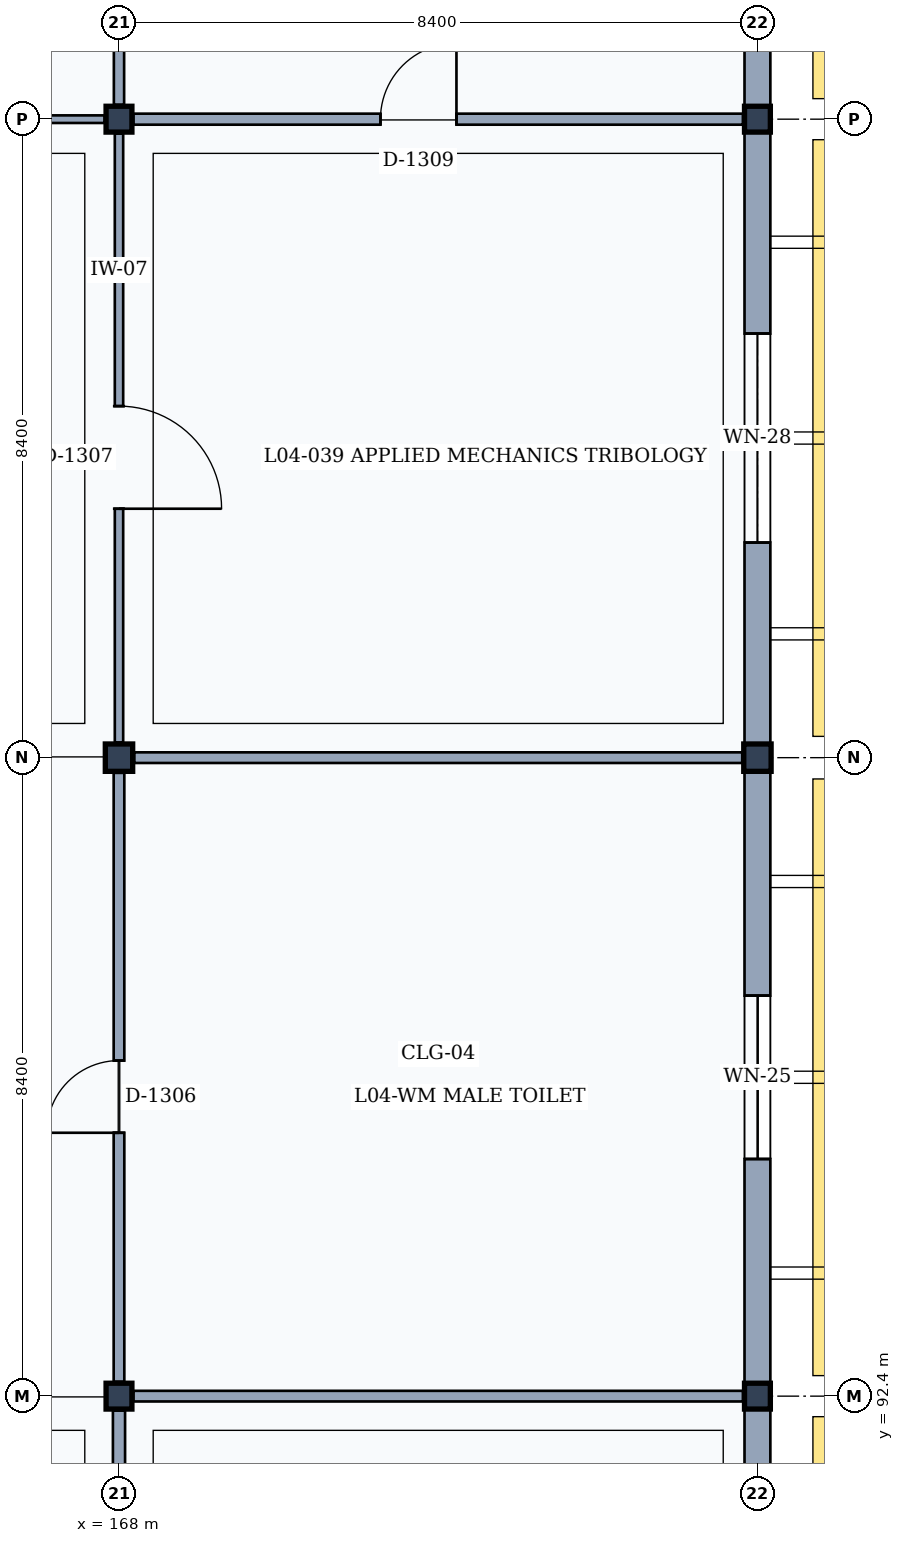
"""IFC4 building model, lengths in metres.
Left out: names, types, materials, properties, quantities, classifications, styles, units other than length and angle.
Written with IfcOpenShell. Run it as: python <this file> out.ifc"""

import sys

from ifc_helpers import new_model, si_unit, direction, frame, frame_2d, origin, origin_2d, place, context, subcontext, project, spatial, rectangle, extrude, element, fill, save


model = new_model("IFC4")
c1 = context("Model", 3, precision=1e-05, world=origin(), true_north=direction((0.0, 1.0)))
c2 = subcontext(c1, "Body", "Model", "MODEL_VIEW")
j1 = project(units=[si_unit("LENGTHUNIT", "METRE"), si_unit("PLANEANGLEUNIT", "RADIAN")], contexts=[c1])
p1 = place(None, origin())
s1 = spatial("IfcSite", under=j1, at=p1, CompositionType="ELEMENT")
p2 = place(p1, origin())
s2 = spatial("IfcBuilding", under=s1, at=p2, CompositionType="ELEMENT")
p3 = place(p2, frame((0.0, 0.0, 18.0)))
s3 = spatial("IfcBuildingStorey", under=s2, at=p3, CompositionType="ELEMENT", Elevation=18.0)
p4 = place(p3, frame((168.0, 92.4, 0.0), z_axis=(0.0, 0.0, 1.0), x_axis=(1.0, 0.0, 0.0)))
e1 = element("IfcColumn", 1, at=p4, inside=s3, PredefinedType="COLUMN", context=c2, shape_type="SweptSolid", body=[
    extrude(rectangle(XDim=0.34, YDim=0.34, at=origin_2d()), origin(), (0.0, 0.0, 1.0), 4.2),
])
p5 = place(p3, frame((168.0, 100.8, 0.0), z_axis=(0.0, 0.0, 1.0), x_axis=(1.0, 0.0, 0.0)))
e2 = element("IfcColumn", 2, at=p5, inside=s3, PredefinedType="COLUMN", context=c2, shape_type="SweptSolid", body=[
    extrude(rectangle(XDim=0.36, YDim=0.36, at=origin_2d()), origin(), (0.0, 0.0, 1.0), 4.2),
])
for number, where, z_axis, x_axis in (
    (3, (168.0, 109.2, 0.0), (0.0, 0.0, 1.0), (1.0, 0.0, 0.0)),
    (4, (176.4, 92.4, 0.0), (0.0, 0.0, 1.0), (1.0, 0.0, 0.0)),
):
    element("IfcColumn", number, at=place(p3, frame(where, z_axis=z_axis, x_axis=x_axis)), inside=s3, PredefinedType="COLUMN", context=c2, shape_type="SweptSolid", body=[
        extrude(rectangle(XDim=0.34, YDim=0.34, at=origin_2d()), origin(), (0.0, 0.0, 1.0), 4.2),
    ])
p6 = place(p3, frame((176.4, 100.8, 0.0), z_axis=(0.0, 0.0, 1.0), x_axis=(1.0, 0.0, 0.0)))
e5 = element("IfcColumn", 5, at=p6, inside=s3, PredefinedType="COLUMN", context=c2, shape_type="SweptSolid", body=[
    extrude(rectangle(XDim=0.36, YDim=0.36, at=origin_2d()), origin(), (0.0, 0.0, 1.0), 4.2),
])
p7 = place(p3, frame((176.4, 109.2, 0.0), z_axis=(0.0, 0.0, 1.0), x_axis=(1.0, 0.0, 0.0)))
e6 = element("IfcColumn", 6, at=p7, inside=s3, PredefinedType="COLUMN", context=c2, shape_type="SweptSolid", body=[
    extrude(rectangle(XDim=0.34, YDim=0.34, at=origin_2d()), origin(), (0.0, 0.0, 1.0), 4.2),
])
p8 = place(p3, frame((176.4, 92.23, 0.0), z_axis=(0.0, 0.0, 1.0), x_axis=(0.0, -1.0, 0.0)))
e7 = element("IfcWall", 7, at=p8, inside=s3, PredefinedType="SOLIDWALL", context=c2, shape_type="SweptSolid", body=[
    extrude(rectangle(XDim=8.05, YDim=0.34, at=frame_2d((4.025, 0.0))), origin(), (0.0, 0.0, 1.0), 3.36),
])
p9 = place(p8, frame((3.3, 0.0, 0.9)))
e8 = element("IfcOpeningElement", 8, at=p9, cuts=e7, PredefinedType="OPENING", context=c2, shape_type="SweptSolid", body=[
    extrude(rectangle(XDim=1.45, YDim=1.8, at=frame_2d((0.725, 0.9))), frame((0.0, 0.18, 0.0), z_axis=(0.0, -1.0, 0.0), x_axis=(1.0, 0.0, 0.0)), (0.0, 0.0, 1.0), 0.36),
])
p10 = place(p3, frame((176.4, 100.62, 0.0), z_axis=(0.0, 0.0, 1.0), x_axis=(0.0, -1.0, 0.0)))
e9 = element("IfcWall", 9, at=p10, inside=s3, PredefinedType="SOLIDWALL", context=c2, shape_type="SweptSolid", body=[
    extrude(rectangle(XDim=8.05, YDim=0.34, at=frame_2d((4.025, 0.0))), origin(), (0.0, 0.0, 1.0), 3.36),
])
p11 = place(p10, frame((2.95, 0.0, 0.9)))
e10 = element("IfcOpeningElement", 10, at=p11, cuts=e9, PredefinedType="OPENING", context=c2, shape_type="SweptSolid", body=[
    extrude(rectangle(XDim=2.15, YDim=1.85, at=frame_2d((1.075, 0.925))), frame((0.0, 0.18, 0.0), z_axis=(0.0, -1.0, 0.0), x_axis=(1.0, 0.0, 0.0)), (0.0, 0.0, 1.0), 0.36),
])
p12 = place(p3, frame((176.4, 109.03, 0.0), z_axis=(0.0, 0.0, 1.0), x_axis=(0.0, -1.0, 0.0)))
e11 = element("IfcWall", 11, at=p12, inside=s3, PredefinedType="SOLIDWALL", context=c2, shape_type="SweptSolid", body=[
    extrude(rectangle(XDim=8.05, YDim=0.34, at=frame_2d((4.025, 0.0))), origin(), (0.0, 0.0, 1.0), 3.36),
])
p13 = place(p12, frame((2.65, 0.0, 0.9)))
e12 = element("IfcOpeningElement", 12, at=p13, cuts=e11, PredefinedType="OPENING", context=c2, shape_type="SweptSolid", body=[
    extrude(rectangle(XDim=2.75, YDim=1.85, at=frame_2d((1.375, 0.925))), frame((0.0, 0.18, 0.0), z_axis=(0.0, -1.0, 0.0), x_axis=(1.0, 0.0, 0.0)), (0.0, 0.0, 1.0), 0.36),
])
p14 = place(p3, frame((176.4, 117.42, 0.0), z_axis=(0.0, 0.0, 1.0), x_axis=(0.0, -1.0, 0.0)))
e13 = element("IfcWall", 13, at=p14, inside=s3, PredefinedType="SOLIDWALL", context=c2, shape_type="SweptSolid", body=[
    extrude(rectangle(XDim=8.05, YDim=0.34, at=frame_2d((4.025, 0.0))), origin(), (0.0, 0.0, 1.0), 3.36),
])
p15 = place(p14, frame((3.15, 0.0, 0.9)))
e14 = element("IfcOpeningElement", 14, at=p15, cuts=e13, PredefinedType="OPENING", context=c2, shape_type="SweptSolid", body=[
    extrude(rectangle(XDim=1.75, YDim=1.85, at=frame_2d((0.875, 0.925))), frame((0.0, 0.18, 0.0), z_axis=(0.0, -1.0, 0.0), x_axis=(1.0, 0.0, 0.0)), (0.0, 0.0, 1.0), 0.36),
])
p16 = place(p3, frame((168.0, 84.2, 0.0), z_axis=(0.0, 0.0, 1.0), x_axis=(0.0, 1.0, 0.0)))
e15 = element("IfcWall", 15, at=p16, inside=s3, PredefinedType="PARTITIONING", context=c2, shape_type="SweptSolid", body=[
    extrude(rectangle(XDim=8.01, YDim=0.16, at=frame_2d((4.005, 0.0))), origin(), (0.0, 0.0, 1.0), 3.32),
])
p17 = place(p16, frame((3.3, 0.0, 0.0)))
e16 = element("IfcOpeningElement", 16, at=p17, cuts=e15, PredefinedType="OPENING", context=c2, shape_type="SweptSolid", body=[
    extrude(rectangle(XDim=0.9, YDim=2.1, at=frame_2d((0.45, 1.05))), frame((0.0, 0.09, 0.0), z_axis=(0.0, -1.0, 0.0), x_axis=(1.0, 0.0, 0.0)), (0.0, 0.0, 1.0), 0.18),
])
p18 = place(p3, frame((168.0, 92.59, 0.0), z_axis=(0.0, 0.0, 1.0), x_axis=(0.0, 1.0, 0.0)))
e17 = element("IfcWall", 17, at=p18, inside=s3, PredefinedType="PARTITIONING", context=c2, shape_type="SweptSolid", body=[
    extrude(rectangle(XDim=8.01, YDim=0.14, at=frame_2d((4.005, 0.0))), origin(), (0.0, 0.0, 1.0), 3.32),
])
p19 = place(p18, frame((3.275, 0.0, 0.0)))
e18 = element("IfcOpeningElement", 18, at=p19, cuts=e17, PredefinedType="OPENING", context=c2, shape_type="SweptSolid", body=[
    extrude(rectangle(XDim=0.95, YDim=2.15, at=frame_2d((0.475, 1.075))), frame((0.0, 0.08, 0.0), z_axis=(0.0, -1.0, 0.0), x_axis=(1.0, 0.0, 0.0)), (0.0, 0.0, 1.0), 0.16),
])
p20 = place(p3, frame((168.0, 101.0, 0.0), z_axis=(0.0, 0.0, 1.0), x_axis=(0.0, 1.0, 0.0)))
e19 = element("IfcWall", 19, at=p20, inside=s3, PredefinedType="PARTITIONING", context=c2, shape_type="SweptSolid", body=[
    extrude(rectangle(XDim=8.01, YDim=0.11, at=frame_2d((4.005, 0.0))), origin(), (0.0, 0.0, 1.0), 3.32),
])
p21 = place(p20, frame((3.075, 0.0, 0.0)))
e20 = element("IfcOpeningElement", 20, at=p21, cuts=e19, PredefinedType="OPENING", context=c2, shape_type="SweptSolid", body=[
    extrude(rectangle(XDim=1.35, YDim=2.25, at=frame_2d((0.675, 1.125))), frame((0.0, 0.065, 0.0), z_axis=(0.0, -1.0, 0.0), x_axis=(1.0, 0.0, 0.0)), (0.0, 0.0, 1.0), 0.13),
])
p22 = place(p3, frame((159.79, 109.2, 0.0), z_axis=(0.0, 0.0, 1.0), x_axis=(1.0, 0.0, 0.0)))
e21 = element("IfcWall", 21, at=p22, inside=s3, PredefinedType="MOVABLE", context=c2, shape_type="SweptSolid", body=[
    extrude(rectangle(XDim=8.02, YDim=0.1, at=frame_2d((4.01, 0.0))), origin(), (0.0, 0.0, 1.0), 3.32),
])
p23 = place(p22, frame((3.025, 0.0, 0.0)))
e22 = element("IfcOpeningElement", 22, at=p23, cuts=e21, PredefinedType="OPENING", context=c2, shape_type="SweptSolid", body=[
    extrude(rectangle(XDim=1.45, YDim=2.35, at=frame_2d((0.725, 1.175))), frame((0.0, 0.06, 0.0), z_axis=(0.0, -1.0, 0.0), x_axis=(1.0, 0.0, 0.0)), (0.0, 0.0, 1.0), 0.12),
])
p24 = place(p3, frame((168.0, 109.39, 0.0), z_axis=(0.0, 0.0, 1.0), x_axis=(0.0, 1.0, 0.0)))
e23 = element("IfcWall", 23, at=p24, inside=s3, PredefinedType="PARTITIONING", context=c2, shape_type="SweptSolid", body=[
    extrude(rectangle(XDim=8.01, YDim=0.135, at=frame_2d((4.005, 0.0))), origin(), (0.0, 0.0, 1.0), 3.32),
])
p25 = place(p3, frame((168.19, 92.4, 0.0), z_axis=(0.0, 0.0, 1.0), x_axis=(1.0, 0.0, 0.0)))
e24 = element("IfcWall", 24, at=p25, inside=s3, PredefinedType="PARTITIONING", context=c2, shape_type="SweptSolid", body=[
    extrude(rectangle(XDim=8.02, YDim=0.14, at=frame_2d((4.01, 0.0))), origin(), (0.0, 0.0, 1.0), 3.32),
])
p26 = place(p3, frame((168.2, 100.8, 0.0), z_axis=(0.0, 0.0, 1.0), x_axis=(1.0, 0.0, 0.0)))
e25 = element("IfcWall", 25, at=p26, inside=s3, PredefinedType="PARTITIONING", context=c2, shape_type="SweptSolid", body=[
    extrude(rectangle(XDim=8.0, YDim=0.14, at=frame_2d((4.0, 0.0))), origin(), (0.0, 0.0, 1.0), 3.32),
])
p27 = place(p3, frame((168.19, 109.2, 0.0), z_axis=(0.0, 0.0, 1.0), x_axis=(1.0, 0.0, 0.0)))
e26 = element("IfcWall", 26, at=p27, inside=s3, PredefinedType="PARTITIONING", context=c2, shape_type="SweptSolid", body=[
    extrude(rectangle(XDim=8.02, YDim=0.145, at=frame_2d((4.01, 0.0))), origin(), (0.0, 0.0, 1.0), 3.32),
])
p28 = place(p27, frame((3.25, 0.0, 0.0)))
e27 = element("IfcOpeningElement", 27, at=p28, cuts=e26, PredefinedType="OPENING", context=c2, shape_type="SweptSolid", body=[
    extrude(rectangle(XDim=1.0, YDim=2.15, at=frame_2d((0.5, 1.075))), frame((0.0, 0.083, 0.0), z_axis=(0.0, -1.0, 0.0), x_axis=(1.0, 0.0, 0.0)), (0.0, 0.0, 1.0), 0.165),
])
p29 = place(p11, origin())
e28 = element("IfcWindow", 28, at=p29, inside=s3, PartitioningType="SINGLE_PANEL", PredefinedType="WINDOW", context=c2, shape_type="SweptSolid", body=[
    extrude(rectangle(XDim=2.15, YDim=1.85, at=frame_2d((1.075, 0.925))), frame((0.0, 0.03, 0.0), z_axis=(0.0, -1.0, 0.0), x_axis=(1.0, 0.0, 0.0)), (0.0, 0.0, 1.0), 0.06),
])
fill(e10, e28)
p30 = place(p13, origin())
e29 = element("IfcWindow", 29, at=p30, inside=s3, PartitioningType="SINGLE_PANEL", PredefinedType="WINDOW", context=c2, shape_type="SweptSolid", body=[
    extrude(rectangle(XDim=2.75, YDim=1.85, at=frame_2d((1.375, 0.925))), frame((0.0, 0.03, 0.0), z_axis=(0.0, -1.0, 0.0), x_axis=(1.0, 0.0, 0.0)), (0.0, 0.0, 1.0), 0.06),
])
fill(e12, e29)
p31 = place(p19, origin())
e30 = element("IfcDoor", 30, at=p31, inside=s3, OperationType="SINGLE_SWING_LEFT", PredefinedType="DOOR", context=c2, shape_type="SweptSolid", body=[
    extrude(rectangle(XDim=0.95, YDim=2.15, at=frame_2d((0.475, 1.075))), frame((0.0, 0.025, 0.0), z_axis=(0.0, -1.0, 0.0), x_axis=(1.0, 0.0, 0.0)), (0.0, 0.0, 1.0), 0.05),
])
fill(e18, e30)
p32 = place(p21, frame((1.35, 0.0, 0.0), z_axis=(0.0, 0.0, 1.0), x_axis=(-1.0, 0.0, 0.0)))
e31 = element("IfcDoor", 31, at=p32, inside=s3, OperationType="SINGLE_SWING_RIGHT", PredefinedType="DOOR", context=c2, shape_type="SweptSolid", body=[
    extrude(rectangle(XDim=1.35, YDim=2.25, at=frame_2d((0.675, 1.125))), frame((0.0, 0.025, 0.0), z_axis=(0.0, -1.0, 0.0), x_axis=(1.0, 0.0, 0.0)), (0.0, 0.0, 1.0), 0.05),
])
fill(e20, e31)
p33 = place(p28, origin())
e32 = element("IfcDoor", 32, at=p33, inside=s3, OperationType="SINGLE_SWING_RIGHT", PredefinedType="DOOR", context=c2, shape_type="SweptSolid", body=[
    extrude(rectangle(XDim=1.0, YDim=2.15, at=frame_2d((0.5, 1.075))), frame((0.0, 0.025, 0.0), z_axis=(0.0, -1.0, 0.0), x_axis=(1.0, 0.0, 0.0)), (0.0, 0.0, 1.0), 0.05),
])
fill(e27, e32)
save(model, sys.argv[1])
